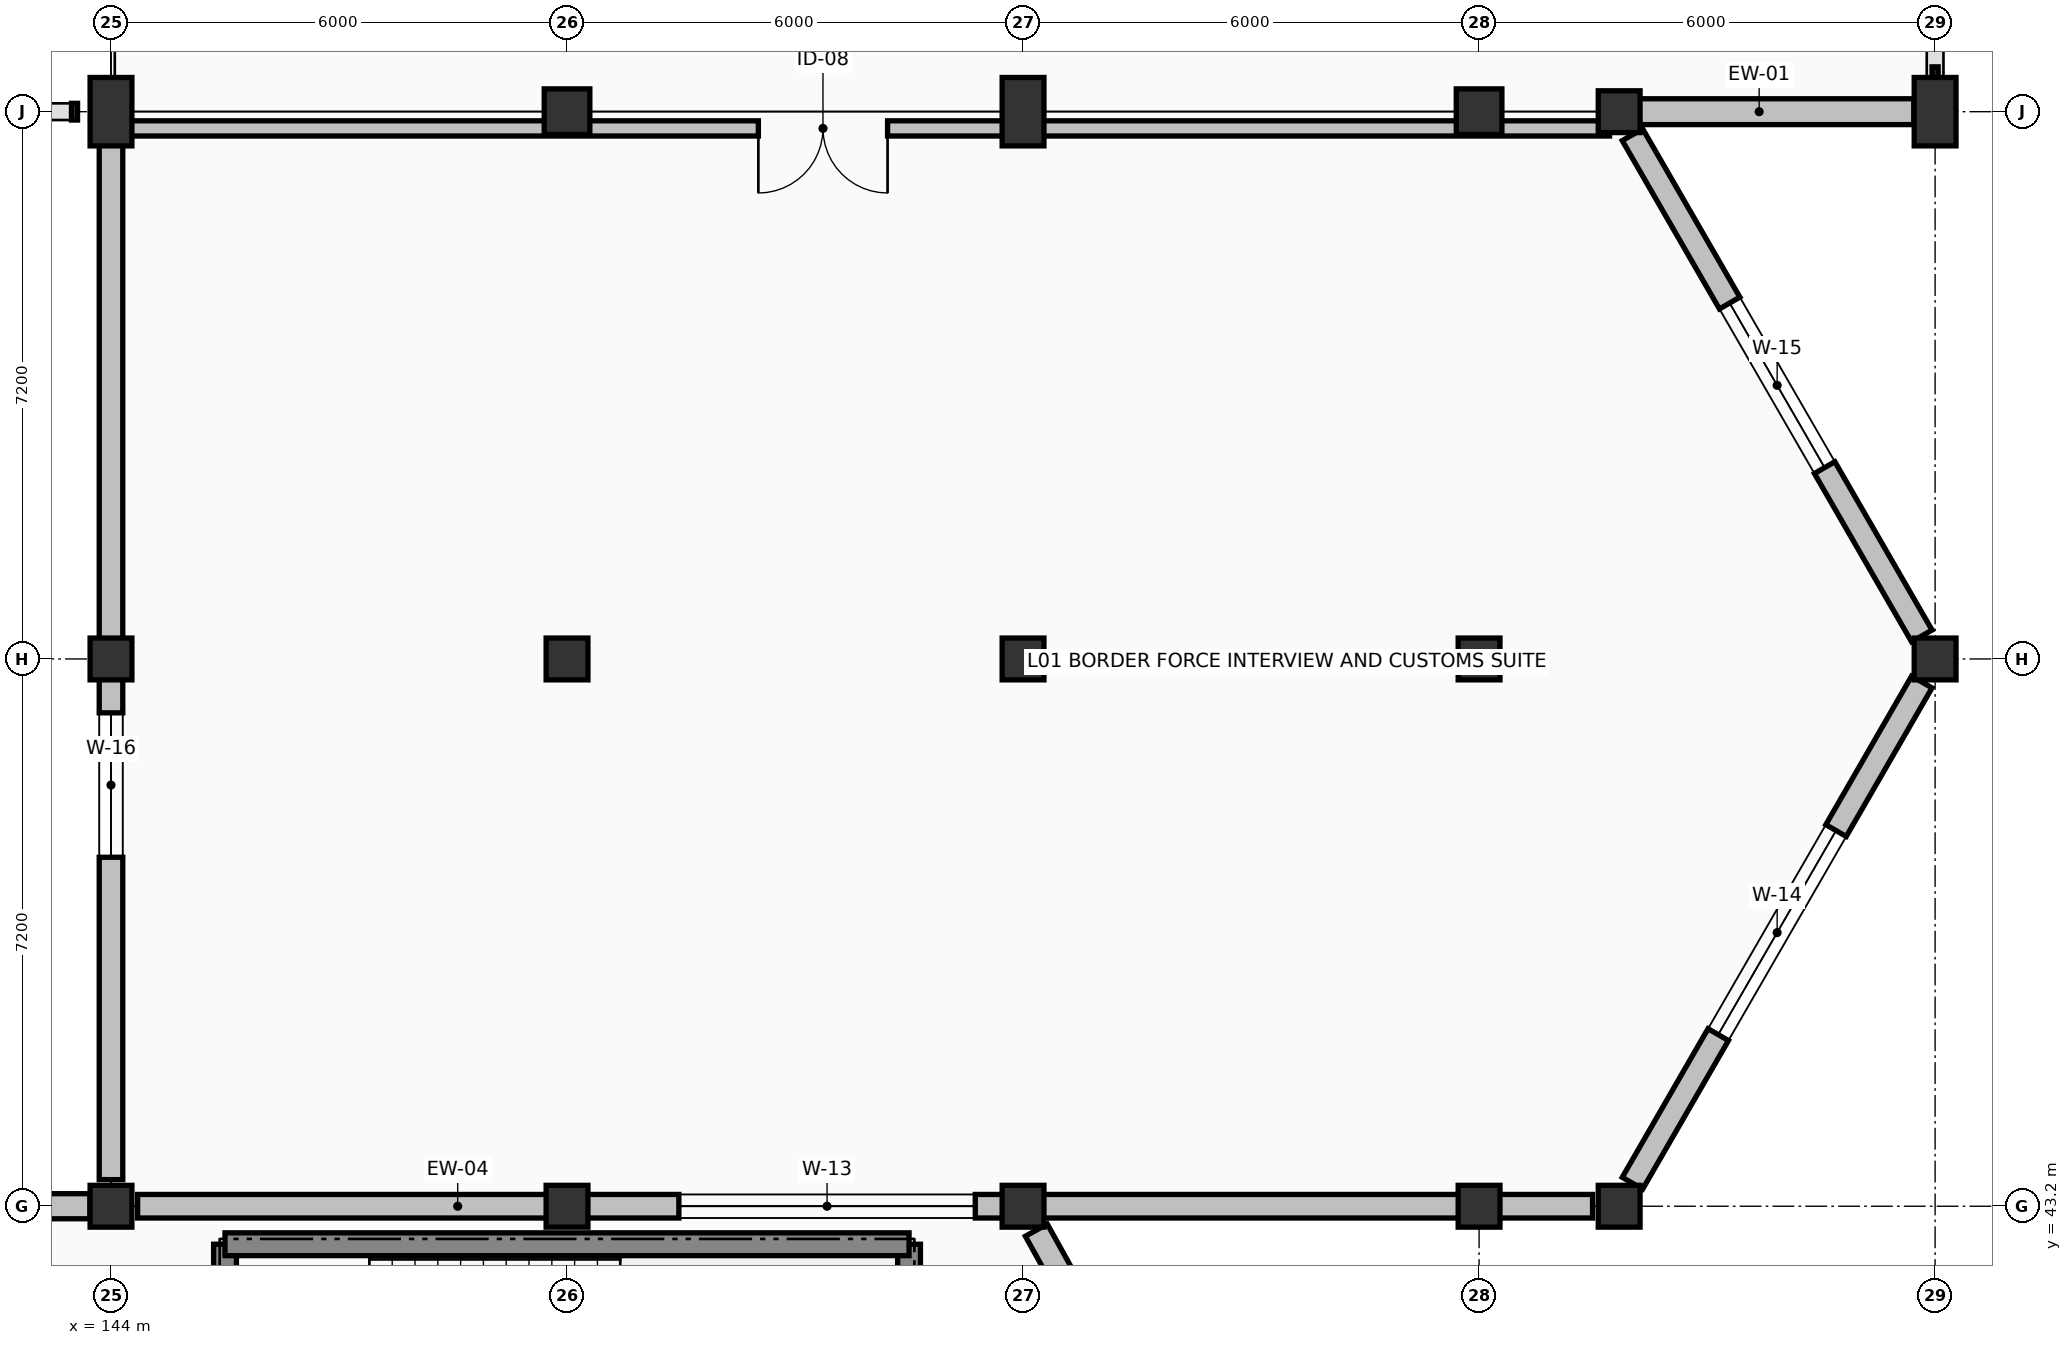
"""IFC4 building model, lengths in metres.
Left out: names, types, materials, properties, quantities, classifications, styles, units other than length and angle.
Written with IfcOpenShell. Run it as: python <this file> out.ifc"""

import sys

from ifc_helpers import new_model, si_unit, direction, frame, frame_2d, origin, origin_2d, place, context, subcontext, project, spatial, rectangle, extrude, element, fill, save


model = new_model("IFC4")
c1 = context("Model", 3, precision=1e-05, world=origin(), true_north=direction((0.0, 1.0)))
c2 = subcontext(c1, "Body", "Model", "MODEL_VIEW")
j1 = project(units=[si_unit("LENGTHUNIT", "METRE"), si_unit("PLANEANGLEUNIT", "RADIAN")], contexts=[c1])
p1 = place(None, origin())
s1 = spatial("IfcSite", under=j1, at=p1, CompositionType="ELEMENT")
p2 = place(p1, origin())
s2 = spatial("IfcBuilding", under=s1, at=p2, CompositionType="ELEMENT")
p3 = place(p2, frame((0.0, 0.0, 5.76)))
s3 = spatial("IfcBuildingStorey", under=s2, at=p3, CompositionType="ELEMENT", Elevation=5.76)
for number, where, z_axis, x_axis in (
    (1, (145.5, 39.1, 0.0), (0.0, 0.0, 1.0), (0.0, 1.0, 0.0)),
    (2, (154.5, 39.1, 0.0), (0.0, 0.0, 1.0), (0.0, 1.0, 0.0)),
):
    element("IfcWall", number, at=place(p3, frame(where, z_axis=z_axis, x_axis=x_axis)), inside=s3, PredefinedType="SHEAR", context=c2, shape_type="SweptSolid", body=[
        extrude(rectangle(XDim=3.6, YDim=0.3, at=frame_2d((1.8, 0.0))), origin(), (0.0, 0.0, 1.0), 4.08),
    ])
p4 = place(p3, frame((144.0, 57.6, 0.0), z_axis=(0.0, 0.0, 1.0), x_axis=(1.0, 0.0, 0.0)))
e3 = element("IfcColumn", 3, at=p4, inside=s3, PredefinedType="COLUMN", context=c2, shape_type="SweptSolid", body=[
    extrude(rectangle(XDim=0.55, YDim=0.9, at=origin_2d()), origin(), (0.0, 0.0, 1.0), 4.08),
])
p5 = place(p3, frame((150.0, 57.6, 0.0), z_axis=(0.0, 0.0, 1.0), x_axis=(1.0, 0.0, 0.0)))
e4 = element("IfcColumn", 4, at=p5, inside=s3, PredefinedType="COLUMN", context=c2, shape_type="SweptSolid", body=[
    extrude(rectangle(XDim=0.6, YDim=0.6, at=origin_2d()), origin(), (0.0, 0.0, 1.0), 4.08),
])
p6 = place(p3, frame((156.0, 57.6, 0.0), z_axis=(0.0, 0.0, 1.0), x_axis=(1.0, 0.0, 0.0)))
e5 = element("IfcColumn", 5, at=p6, inside=s3, PredefinedType="COLUMN", context=c2, shape_type="SweptSolid", body=[
    extrude(rectangle(XDim=0.55, YDim=0.9, at=origin_2d()), origin(), (0.0, 0.0, 1.0), 4.08),
])
p7 = place(p3, frame((162.0, 57.6, 0.0), z_axis=(0.0, 0.0, 1.0), x_axis=(1.0, 0.0, 0.0)))
e6 = element("IfcColumn", 6, at=p7, inside=s3, PredefinedType="COLUMN", context=c2, shape_type="SweptSolid", body=[
    extrude(rectangle(XDim=0.6, YDim=0.6, at=origin_2d()), origin(), (0.0, 0.0, 1.0), 4.08),
])
p8 = place(p3, frame((168.0, 57.6, 0.0), z_axis=(0.0, 0.0, 1.0), x_axis=(1.0, 0.0, 0.0)))
e7 = element("IfcColumn", 7, at=p8, inside=s3, PredefinedType="COLUMN", context=c2, shape_type="SweptSolid", body=[
    extrude(rectangle(XDim=0.55, YDim=0.9, at=origin_2d()), origin(), (0.0, 0.0, 1.0), 4.08),
])
for number, where, z_axis, x_axis in (
    (8, (144.0, 43.2, 0.0), (0.0, 0.0, 1.0), (1.0, 0.0, 0.0)),
    (9, (144.0, 50.4, 0.0), (0.0, 0.0, 1.0), (1.0, 0.0, 0.0)),
    (10, (150.0, 43.2, 0.0), (0.0, 0.0, 1.0), (1.0, 0.0, 0.0)),
    (11, (150.0, 50.4, 0.0), (0.0, 0.0, 1.0), (1.0, 0.0, 0.0)),
    (12, (156.0, 43.2, 0.0), (0.0, 0.0, 1.0), (1.0, 0.0, 0.0)),
    (13, (156.0, 50.4, 0.0), (0.0, 0.0, 1.0), (1.0, 0.0, 0.0)),
    (14, (162.0, 43.2, 0.0), (0.0, 0.0, 1.0), (1.0, 0.0, 0.0)),
    (15, (162.0, 50.4, 0.0), (0.0, 0.0, 1.0), (1.0, 0.0, 0.0)),
    (16, (163.843, 43.2, 0.0), (0.0, 0.0, 1.0), (1.0, 0.0, 0.0)),
    (17, (163.843, 57.6, 0.0), (0.0, 0.0, 1.0), (1.0, 0.0, 0.0)),
    (18, (168.0, 50.4, 0.0), (0.0, 0.0, 1.0), (1.0, 0.0, 0.0)),
):
    element("IfcColumn", number, at=place(p3, frame(where, z_axis=z_axis, x_axis=x_axis)), inside=s3, PredefinedType="COLUMN", context=c2, shape_type="SweptSolid", body=[
        extrude(rectangle(XDim=0.55, YDim=0.55, at=origin_2d()), origin(), (0.0, 0.0, 1.0), 4.08),
    ])
p9 = place(p3, frame((144.35, 43.2, 0.0), z_axis=(0.0, 0.0, 1.0), x_axis=(1.0, 0.0, 0.0)))
e19 = element("IfcWall", 19, at=p9, inside=s3, PredefinedType="SOLIDWALL", context=c2, shape_type="SweptSolid", body=[
    extrude(rectangle(XDim=19.143, YDim=0.31, at=frame_2d((9.572, 0.0))), origin(), (0.0, 0.0, 1.0), 3.47),
])
p10 = place(p9, frame((7.121, 0.0, 1.65)))
e20 = element("IfcOpeningElement", 20, at=p10, cuts=e19, PredefinedType="OPENING", context=c2, shape_type="SweptSolid", body=[
    extrude(rectangle(XDim=3.9, YDim=0.95, at=frame_2d((1.95, 0.475))), frame((0.0, 0.165, 0.0), z_axis=(0.0, -1.0, 0.0), x_axis=(1.0, 0.0, 0.0)), (0.0, 0.0, 1.0), 0.33),
])
p11 = place(p3, frame((164.018, 43.503, 0.0), z_axis=(0.0, 0.0, 1.0), x_axis=(0.499998170572, 0.866026460002, 0.0)))
e21 = element("IfcWall", 21, at=p11, inside=s3, PredefinedType="SOLIDWALL", context=c2, shape_type="SweptSolid", body=[
    extrude(rectangle(XDim=7.614, YDim=0.31, at=frame_2d((3.807, 0.0))), origin(), (0.0, 0.0, 1.0), 3.47),
])
p12 = place(p11, frame((2.257, 0.0, 1.65)))
e22 = element("IfcOpeningElement", 22, at=p12, cuts=e21, PredefinedType="OPENING", context=c2, shape_type="SweptSolid", body=[
    extrude(rectangle(XDim=3.1, YDim=0.95, at=frame_2d((1.55, 0.475))), frame((0.0, 0.165, 0.0), z_axis=(0.0, -1.0, 0.0), x_axis=(1.0, 0.0, 0.0)), (0.0, 0.0, 1.0), 0.33),
])
p13 = place(p3, frame((167.825, 50.703, 0.0), z_axis=(0.0, 0.0, 1.0), x_axis=(-0.499998170572, 0.866026460002, 0.0)))
e23 = element("IfcWall", 23, at=p13, inside=s3, PredefinedType="SOLIDWALL", context=c2, shape_type="SweptSolid", body=[
    extrude(rectangle(XDim=7.614, YDim=0.31, at=frame_2d((3.807, 0.0))), origin(), (0.0, 0.0, 1.0), 3.47),
])
p14 = place(p13, frame((2.557, 0.0, 1.65)))
e24 = element("IfcOpeningElement", 24, at=p14, cuts=e23, PredefinedType="OPENING", context=c2, shape_type="SweptSolid", body=[
    extrude(rectangle(XDim=2.5, YDim=0.9, at=frame_2d((1.25, 0.45))), frame((0.0, 0.165, 0.0), z_axis=(0.0, -1.0, 0.0), x_axis=(1.0, 0.0, 0.0)), (0.0, 0.0, 1.0), 0.33),
])
p15 = place(p3, frame((144.0, 57.25, 0.0), z_axis=(0.0, 0.0, 1.0), x_axis=(0.0, -1.0, 0.0)))
e25 = element("IfcWall", 25, at=p15, inside=s3, PredefinedType="SOLIDWALL", context=c2, shape_type="SweptSolid", body=[
    extrude(rectangle(XDim=13.7, YDim=0.31, at=frame_2d((6.85, 0.0))), origin(), (0.0, 0.0, 1.0), 3.47),
])
p16 = place(p15, frame((7.559, 0.0, 1.65)))
e26 = element("IfcOpeningElement", 26, at=p16, cuts=e25, PredefinedType="OPENING", context=c2, shape_type="SweptSolid", body=[
    extrude(rectangle(XDim=1.9, YDim=0.9, at=frame_2d((0.95, 0.45))), frame((0.0, 0.165, 0.0), z_axis=(0.0, -1.0, 0.0), x_axis=(1.0, 0.0, 0.0)), (0.0, 0.0, 1.0), 0.33),
])
p17 = place(p3, frame((163.65, 57.6, 0.0), z_axis=(0.0, 0.0, 1.0), x_axis=(1.0, 0.0, 0.0)))
e27 = element("IfcWall", 27, at=p17, inside=s3, PredefinedType="SOLIDWALL", context=c2, shape_type="SweptSolid", body=[
    extrude(rectangle(XDim=4.07, YDim=0.34, at=frame_2d((2.035, 0.0))), origin(), (0.0, 0.0, 1.0), 3.76),
])
p18 = place(p3, frame((159.825, 36.315, 0.0), z_axis=(0.0, 0.0, 1.0), x_axis=(-0.485651204539, 0.874152679759, 0.0)))
e28 = element("IfcWall", 28, at=p18, inside=s3, PredefinedType="SOLIDWALL", context=c2, shape_type="SweptSolid", body=[
    extrude(rectangle(XDim=7.517, YDim=0.33, at=frame_2d((3.758, 0.0))), origin(), (0.0, 0.0, 1.0), 3.49),
])
p19 = place(p3, frame((138.377, 43.2, 0.0), z_axis=(0.0, 0.0, 1.0), x_axis=(1.0, 0.0, 0.0)))
e29 = element("IfcWall", 29, at=p19, inside=s3, PredefinedType="SOLIDWALL", context=c2, shape_type="SweptSolid", body=[
    extrude(rectangle(XDim=5.346, YDim=0.33, at=frame_2d((2.673, 0.0))), origin(), (0.0, 0.0, 1.0), 3.44),
])
p20 = place(p3, frame((145.5, 42.7, 0.0), z_axis=(0.0, 0.0, 1.0), x_axis=(1.0, 0.0, 0.0)))
e30 = element("IfcWall", 30, at=p20, inside=s3, PredefinedType="SHEAR", context=c2, shape_type="SweptSolid", body=[
    extrude(rectangle(XDim=9.0, YDim=0.3, at=frame_2d((4.5, 0.0))), origin(), (0.0, 0.0, 1.0), 4.08),
])
p21 = place(p3, frame((163.716, 57.38, 0.0), z_axis=(0.0, 0.0, 1.0), x_axis=(-1.0, 0.0, 0.0)))
e31 = element("IfcWall", 31, at=p21, inside=s3, PredefinedType="PARTITIONING", context=c2, shape_type="SweptSolid", body=[
    extrude(rectangle(XDim=19.496, YDim=0.2, at=frame_2d((9.748, 0.0))), origin(), (0.0, 0.0, 1.0), 3.47),
])
p22 = place(p21, frame((9.499, 0.0, 0.0)))
e32 = element("IfcOpeningElement", 32, at=p22, cuts=e31, PredefinedType="OPENING", context=c2, shape_type="SweptSolid", body=[
    extrude(rectangle(XDim=1.7, YDim=2.25, at=frame_2d((0.85, 1.125))), frame((0.0, 0.11, 0.0), z_axis=(0.0, -1.0, 0.0), x_axis=(1.0, 0.0, 0.0)), (0.0, 0.0, 1.0), 0.22),
])
p23 = place(p10, origin())
e33 = element("IfcWindow", 33, at=p23, inside=s3, PartitioningType="SINGLE_PANEL", PredefinedType="WINDOW", context=c2, shape_type="SweptSolid", body=[
    extrude(rectangle(XDim=3.9, YDim=0.95, at=frame_2d((1.95, 0.475))), frame((0.0, 0.03, 0.0), z_axis=(0.0, -1.0, 0.0), x_axis=(1.0, 0.0, 0.0)), (0.0, 0.0, 1.0), 0.06),
])
fill(e20, e33)
p24 = place(p12, origin())
e34 = element("IfcWindow", 34, at=p24, inside=s3, PartitioningType="SINGLE_PANEL", PredefinedType="WINDOW", context=c2, shape_type="SweptSolid", body=[
    extrude(rectangle(XDim=3.1, YDim=0.95, at=frame_2d((1.55, 0.475))), frame((0.0, 0.03, 0.0), z_axis=(0.0, -1.0, 0.0), x_axis=(1.0, 0.0, 0.0)), (0.0, 0.0, 1.0), 0.06),
])
fill(e22, e34)
p25 = place(p14, origin())
e35 = element("IfcWindow", 35, at=p25, inside=s3, PartitioningType="SINGLE_PANEL", PredefinedType="WINDOW", context=c2, shape_type="SweptSolid", body=[
    extrude(rectangle(XDim=2.5, YDim=0.9, at=frame_2d((1.25, 0.45))), frame((0.0, 0.03, 0.0), z_axis=(0.0, -1.0, 0.0), x_axis=(1.0, 0.0, 0.0)), (0.0, 0.0, 1.0), 0.06),
])
fill(e24, e35)
p26 = place(p16, origin())
e36 = element("IfcWindow", 36, at=p26, inside=s3, PartitioningType="SINGLE_PANEL", PredefinedType="WINDOW", context=c2, shape_type="SweptSolid", body=[
    extrude(rectangle(XDim=1.9, YDim=0.9, at=frame_2d((0.95, 0.45))), frame((0.0, 0.03, 0.0), z_axis=(0.0, -1.0, 0.0), x_axis=(1.0, 0.0, 0.0)), (0.0, 0.0, 1.0), 0.06),
])
fill(e26, e36)
p27 = place(p22, origin())
e37 = element("IfcDoor", 37, at=p27, inside=s3, OperationType="DOUBLE_SWING_LEFT", PredefinedType="DOOR", context=c2, shape_type="SweptSolid", body=[
    extrude(rectangle(XDim=1.7, YDim=2.25, at=frame_2d((0.85, 1.125))), frame((0.0, 0.025, 0.0), z_axis=(0.0, -1.0, 0.0), x_axis=(1.0, 0.0, 0.0)), (0.0, 0.0, 1.0), 0.05),
])
fill(e32, e37)
save(model, sys.argv[1])
